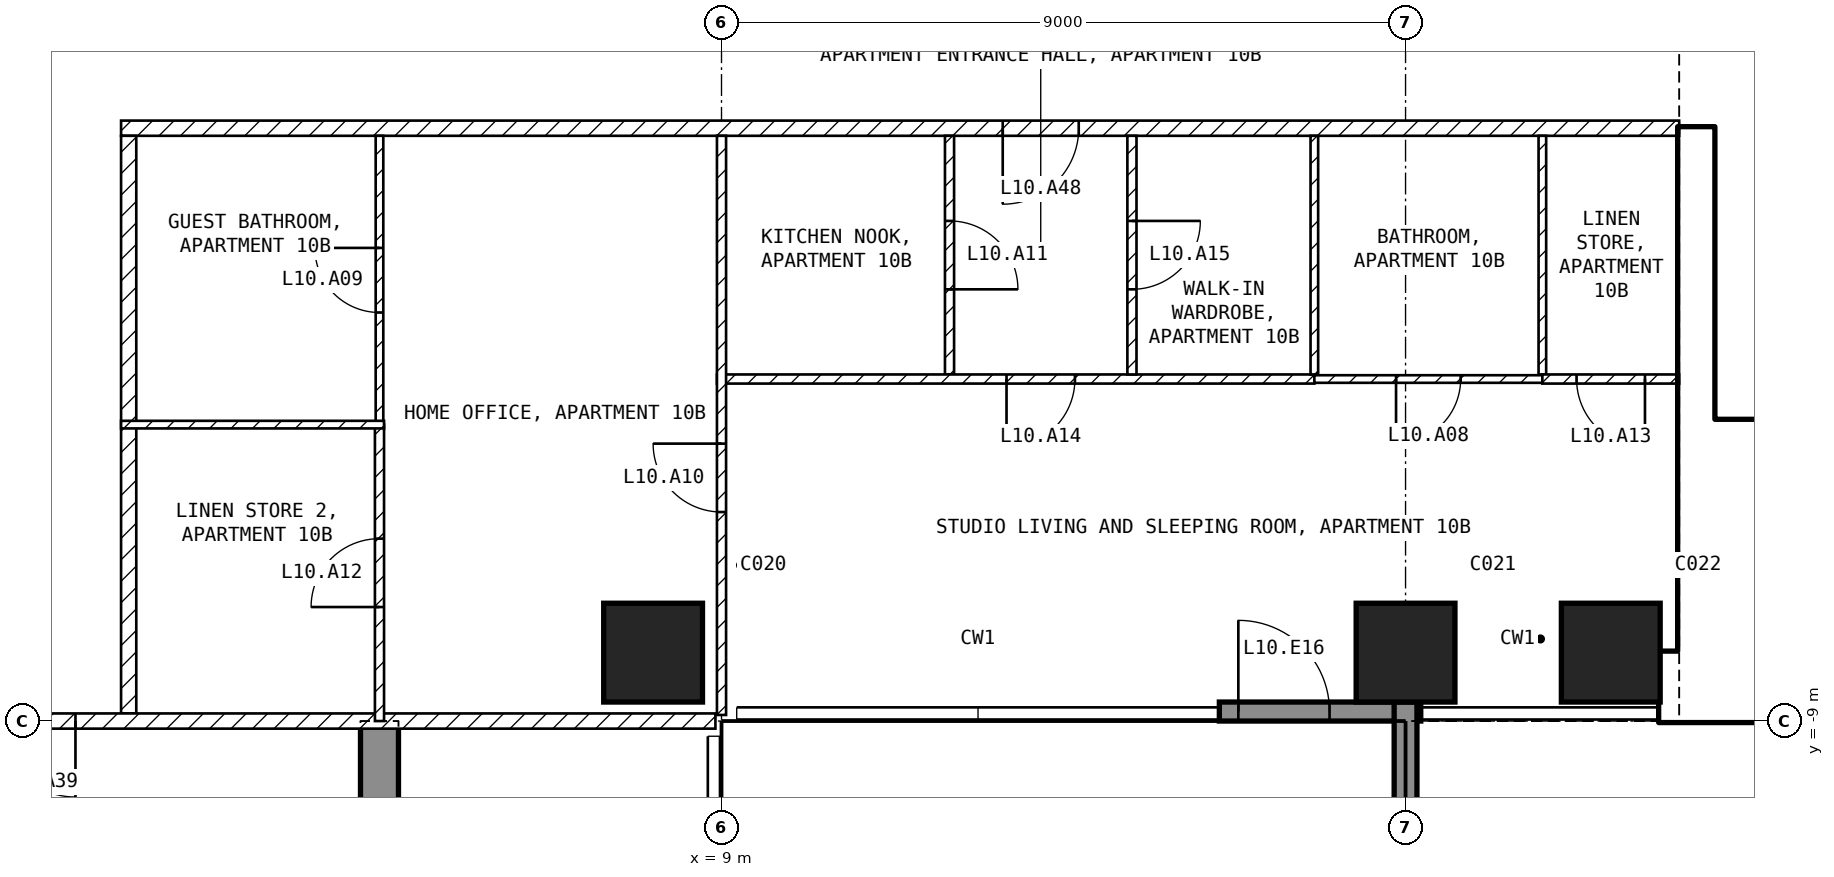
"""IFC4 building model, lengths in metres.
Left out: names, types, materials, properties, quantities, classifications, styles, units other than length and angle.
Written with IfcOpenShell. Run it as: python <this file> out.ifc"""

import sys

from ifc_helpers import new_model, si_unit, direction, frame, frame_2d, origin, origin_2d, place, context, subcontext, project, spatial, polyline, rectangle, outline, extrude, element, fill, save


model = new_model("IFC4")
c1 = context("Model", 3, precision=1e-05, world=origin(), true_north=direction((0.0, 1.0)))
c2 = subcontext(c1, "Body", "Model", "MODEL_VIEW")
j1 = project(units=[si_unit("LENGTHUNIT", "METRE"), si_unit("PLANEANGLEUNIT", "RADIAN")], contexts=[c1])
p1 = place(None, origin())
s1 = spatial("IfcSite", under=j1, at=p1, CompositionType="ELEMENT")
p2 = place(p1, origin())
s2 = spatial("IfcBuilding", under=s1, at=p2, CompositionType="ELEMENT")
p3 = place(p2, frame((0.0, 0.0, 54.0)))
s3 = spatial("IfcBuildingStorey", under=s2, at=p3, CompositionType="ELEMENT", Elevation=54.0)
for number, where, z_axis, x_axis in (
    (1, (8.1, -8.1, -0.25), (0.0, 0.0, 1.0), (1.0, 0.0, 0.0)),
    (2, (18.0, -8.1, -0.25), (0.0, 0.0, 1.0), (1.0, 0.0, 0.0)),
    (3, (20.7, -8.1, -0.25), (0.0, 0.0, 1.0), (1.0, 0.0, 0.0)),
):
    element("IfcColumn", number, at=place(p3, frame(where, z_axis=z_axis, x_axis=x_axis)), inside=s3, PredefinedType="COLUMN", context=c2, shape_type="SweptSolid", body=[
        extrude(rectangle(XDim=1.3, YDim=1.3, at=origin_2d()), origin(), (0.0, 0.0, 1.0), 3.5),
    ])
p4 = place(p3, frame((4.25, -25.45, -0.25), z_axis=(1.0, 0.0, 0.0), x_axis=(0.0, 1.0, 0.0)))
e4 = element("IfcWall", 4, at=p4, inside=s3, PredefinedType="SHEAR", context=c2, shape_type="SweptSolid", body=[
    extrude(outline(polyline([(0.0, 0.0), (4.15, 0.0), (4.15, 2.65), (6.55, 2.65), (6.55, 0.0), (11.95, 0.0), (11.95, 2.65), (14.35, 2.65), (14.35, 0.0), (16.45, 0.0), (16.45, 3.5), (0.0, 3.5), (0.0, 0.0)])), origin(), (0.0, 0.0, 1.0), 0.5),
])
p5 = place(p3, frame((15.55, -8.875, 0.0), z_axis=(0.0, 0.0, 1.0), x_axis=(1.0, 0.0, 0.0)))
e5 = element("IfcWall", 5, at=p5, inside=s3, PredefinedType="SOLIDWALL", context=c2, shape_type="SweptSolid", body=[
    extrude(rectangle(XDim=2.65, YDim=0.25, at=frame_2d((1.325, 0.0))), origin(), (0.0, 0.0, 1.0), 3.25),
])
p6 = place(p5, frame((0.25, 0.0, 0.0)))
e6 = element("IfcOpeningElement", 6, at=p6, cuts=e5, PredefinedType="OPENING", context=c2, shape_type="SweptSolid", body=[
    extrude(rectangle(XDim=1.2, YDim=2.4, at=frame_2d((0.6, 1.2))), frame((0.0, 0.135, 0.0), z_axis=(0.0, -1.0, 0.0), x_axis=(1.0, 0.0, 0.0)), (0.0, 0.0, 1.0), 0.27),
])
p7 = place(p3, frame((18.0, -8.75, 0.0), z_axis=(0.0, 0.0, 1.0), x_axis=(0.0, -1.0, 0.0)))
e7 = element("IfcWall", 7, at=p7, inside=s3, PredefinedType="SOLIDWALL", context=c2, shape_type="SweptSolid", body=[
    extrude(rectangle(XDim=2.95, YDim=0.3, at=frame_2d((1.475, 0.0))), origin(), (0.0, 0.0, 1.0), 3.25),
])
p8 = place(p3, frame((21.35, -8.55, 0.0), z_axis=(0.0, 0.0, 1.0), x_axis=(1.0, 0.0, 0.0)))
e8 = element("IfcWall", 8, at=p8, inside=s3, PredefinedType="SHEAR", context=c2, shape_type="SweptSolid", body=[
    extrude(rectangle(XDim=11.05, YDim=0.9, at=frame_2d((5.525, 0.0))), origin(), (0.0, 0.0, 1.0), 3.25),
])
p9 = place(p3, frame((21.825, -8.1, 0.0), z_axis=(0.0, 0.0, 1.0), x_axis=(0.0, 1.0, 0.0)))
e9 = element("IfcWall", 9, at=p9, inside=s3, PredefinedType="SHEAR", context=c2, shape_type="SweptSolid", body=[
    extrude(rectangle(XDim=6.9, YDim=0.45, at=frame_2d((3.45, 0.0))), origin(), (0.0, 0.0, 1.0), 3.25),
])
p10 = place(p3, frame((22.05, -5.15, 0.0), z_axis=(0.0, 0.0, 1.0), x_axis=(1.0, 0.0, 0.0)))
e10 = element("IfcWall", 10, at=p10, inside=s3, PredefinedType="SOLIDWALL", context=c2, shape_type="SweptSolid", body=[
    extrude(rectangle(XDim=6.3, YDim=0.2, at=frame_2d((3.15, 0.0))), origin(), (0.0, 0.0, 1.0), 3.25),
])
p11 = place(p10, frame((0.2, 0.0, 0.0)))
e11 = element("IfcOpeningElement", 11, at=p11, cuts=e10, PredefinedType="OPENING", context=c2, shape_type="SweptSolid", body=[
    extrude(rectangle(XDim=1.0, YDim=2.1, at=frame_2d((0.5, 1.05))), frame((0.0, 0.11, 0.0), z_axis=(0.0, -1.0, 0.0), x_axis=(1.0, 0.0, 0.0)), (0.0, 0.0, 1.0), 0.22),
])
p12 = place(p3, frame((21.6, -1.2, 0.0), z_axis=(0.0, 0.0, 1.0), x_axis=(-1.0, 0.0, 0.0)))
e12 = element("IfcWall", 12, at=p12, inside=s3, PredefinedType="PARTITIONING", context=c2, shape_type="SweptSolid", body=[
    extrude(rectangle(XDim=20.5, YDim=0.2, at=frame_2d((10.25, 0.0))), origin(), (0.0, 0.0, 1.0), 3.25),
])
p13 = place(p12, frame((7.9, 0.0, 0.0)))
e13 = element("IfcOpeningElement", 13, at=p13, cuts=e12, PredefinedType="OPENING", context=c2, shape_type="SweptSolid", body=[
    extrude(rectangle(XDim=1.0, YDim=2.1, at=frame_2d((0.5, 1.05))), frame((0.0, 0.11, 0.0), z_axis=(0.0, -1.0, 0.0), x_axis=(1.0, 0.0, 0.0)), (0.0, 0.0, 1.0), 0.22),
])
p14 = place(p3, frame((1.2, -1.3, 0.0), z_axis=(0.0, 0.0, 1.0), x_axis=(0.0, -1.0, 0.0)))
e14 = element("IfcWall", 14, at=p14, inside=s3, PredefinedType="PARTITIONING", context=c2, shape_type="SweptSolid", body=[
    extrude(rectangle(XDim=7.6, YDim=0.2, at=frame_2d((3.8, 0.0))), origin(), (0.0, 0.0, 1.0), 3.25),
])
p15 = place(p3, frame((8.92, -9.0, 0.0), z_axis=(0.0, 0.0, 1.0), x_axis=(-1.0, 0.0, 0.0)))
e15 = element("IfcWall", 15, at=p15, inside=s3, PredefinedType="PARTITIONING", context=c2, shape_type="SweptSolid", body=[
    extrude(rectangle(XDim=17.84, YDim=0.2, at=frame_2d((8.92, 0.0))), origin(), (0.0, 0.0, 1.0), 3.25),
])
p16 = place(p15, frame((8.42, 0.0, 0.0)))
e16 = element("IfcOpeningElement", 16, at=p16, cuts=e15, PredefinedType="OPENING", context=c2, shape_type="SweptSolid", body=[
    extrude(rectangle(XDim=1.0, YDim=2.1, at=frame_2d((0.5, 1.05))), frame((0.0, 0.11, 0.0), z_axis=(0.0, -1.0, 0.0), x_axis=(1.0, 0.0, 0.0)), (0.0, 0.0, 1.0), 0.22),
])
p17 = place(p3, frame((12.0, -1.3, 0.0), z_axis=(0.0, 0.0, 1.0), x_axis=(0.0, -1.0, 0.0)))
e17 = element("IfcWall", 17, at=p17, inside=s3, PredefinedType="PARTITIONING", context=c2, shape_type="SweptSolid", body=[
    extrude(rectangle(XDim=3.14, YDim=0.12, at=frame_2d((1.57, 0.0))), origin(), (0.0, 0.0, 1.0), 3.25),
])
p18 = place(p17, frame((1.12, 0.0, 0.0)))
e18 = element("IfcOpeningElement", 18, at=p18, cuts=e17, PredefinedType="OPENING", context=c2, shape_type="SweptSolid", body=[
    extrude(rectangle(XDim=0.9, YDim=2.1, at=frame_2d((0.45, 1.05))), frame((0.0, 0.07, 0.0), z_axis=(0.0, -1.0, 0.0), x_axis=(1.0, 0.0, 0.0)), (0.0, 0.0, 1.0), 0.14),
])
p19 = place(p3, frame((16.8, -4.5, 0.0), z_axis=(0.0, 0.0, 1.0), x_axis=(-1.0, 0.0, 0.0)))
e19 = element("IfcWall", 19, at=p19, inside=s3, PredefinedType="PARTITIONING", context=c2, shape_type="SweptSolid", body=[
    extrude(rectangle(XDim=7.86, YDim=0.12, at=frame_2d((3.93, 0.0))), origin(), (0.0, 0.0, 1.0), 3.25),
])
p20 = place(p19, frame((3.15, 0.0, 0.0)))
e20 = element("IfcOpeningElement", 20, at=p20, cuts=e19, PredefinedType="OPENING", context=c2, shape_type="SweptSolid", body=[
    extrude(rectangle(XDim=0.9, YDim=2.1, at=frame_2d((0.45, 1.05))), frame((0.0, 0.07, 0.0), z_axis=(0.0, -1.0, 0.0), x_axis=(1.0, 0.0, 0.0)), (0.0, 0.0, 1.0), 0.14),
])
p21 = place(p3, frame((9.0, -8.92, 0.0), z_axis=(0.0, 0.0, 1.0), x_axis=(0.0, 1.0, 0.0)))
e21 = element("IfcWall", 21, at=p21, inside=s3, PredefinedType="PARTITIONING", context=c2, shape_type="SweptSolid", body=[
    extrude(rectangle(XDim=7.62, YDim=0.12, at=frame_2d((3.81, 0.0))), origin(), (0.0, 0.0, 1.0), 3.25),
])
p22 = place(p21, frame((2.67, 0.0, 0.0)))
e22 = element("IfcOpeningElement", 22, at=p22, cuts=e21, PredefinedType="OPENING", context=c2, shape_type="SweptSolid", body=[
    extrude(rectangle(XDim=0.9, YDim=2.1, at=frame_2d((0.45, 1.05))), frame((0.0, 0.07, 0.0), z_axis=(0.0, -1.0, 0.0), x_axis=(1.0, 0.0, 0.0)), (0.0, 0.0, 1.0), 0.14),
])
p23 = place(p3, frame((14.4, -1.3, 0.0), z_axis=(0.0, 0.0, 1.0), x_axis=(0.0, -1.0, 0.0)))
e23 = element("IfcWall", 23, at=p23, inside=s3, PredefinedType="PARTITIONING", context=c2, shape_type="SweptSolid", body=[
    extrude(rectangle(XDim=3.14, YDim=0.12, at=frame_2d((1.57, 0.0))), origin(), (0.0, 0.0, 1.0), 3.25),
])
p24 = place(p23, frame((1.12, 0.0, 0.0)))
e24 = element("IfcOpeningElement", 24, at=p24, cuts=e23, PredefinedType="OPENING", context=c2, shape_type="SweptSolid", body=[
    extrude(rectangle(XDim=0.9, YDim=2.1, at=frame_2d((0.45, 1.05))), frame((0.0, 0.07, 0.0), z_axis=(0.0, -1.0, 0.0), x_axis=(1.0, 0.0, 0.0)), (0.0, 0.0, 1.0), 0.14),
])
for number, where, z_axis, x_axis in (
    (25, (16.8, -1.3, 0.0), (0.0, 0.0, 1.0), (0.0, -1.0, 0.0)),
    (26, (19.8, -1.3, 0.0), (0.0, 0.0, 1.0), (0.0, -1.0, 0.0)),
):
    element("IfcWall", number, at=place(p3, frame(where, z_axis=z_axis, x_axis=x_axis)), inside=s3, PredefinedType="PARTITIONING", context=c2, shape_type="SweptSolid", body=[
        extrude(rectangle(XDim=3.14, YDim=0.1, at=frame_2d((1.57, 0.0))), origin(), (0.0, 0.0, 1.0), 3.25),
    ])
p25 = place(p3, frame((19.8, -4.5, 0.0), z_axis=(0.0, 0.0, 1.0), x_axis=(-1.0, 0.0, 0.0)))
e27 = element("IfcWall", 27, at=p25, inside=s3, PredefinedType="PARTITIONING", context=c2, shape_type="SweptSolid", body=[
    extrude(rectangle(XDim=3.0, YDim=0.1, at=frame_2d((1.5, 0.0))), origin(), (0.0, 0.0, 1.0), 3.25),
])
p26 = place(p25, frame((1.075, 0.0, 0.0)))
e28 = element("IfcOpeningElement", 28, at=p26, cuts=e27, PredefinedType="OPENING", context=c2, shape_type="SweptSolid", body=[
    extrude(rectangle(XDim=0.85, YDim=2.1, at=frame_2d((0.425, 1.05))), frame((0.0, 0.06, 0.0), z_axis=(0.0, -1.0, 0.0), x_axis=(1.0, 0.0, 0.0)), (0.0, 0.0, 1.0), 0.12),
])
p27 = place(p3, frame((21.6, -4.5, 0.0), z_axis=(0.0, 0.0, 1.0), x_axis=(-1.0, 0.0, 0.0)))
e29 = element("IfcWall", 29, at=p27, inside=s3, PredefinedType="PARTITIONING", context=c2, shape_type="SweptSolid", body=[
    extrude(rectangle(XDim=1.8, YDim=0.12, at=frame_2d((0.9, 0.0))), origin(), (0.0, 0.0, 1.0), 3.25),
])
p28 = place(p27, frame((0.45, 0.0, 0.0)))
e30 = element("IfcOpeningElement", 30, at=p28, cuts=e29, PredefinedType="OPENING", context=c2, shape_type="SweptSolid", body=[
    extrude(rectangle(XDim=0.9, YDim=2.1, at=frame_2d((0.45, 1.05))), frame((0.0, 0.07, 0.0), z_axis=(0.0, -1.0, 0.0), x_axis=(1.0, 0.0, 0.0)), (0.0, 0.0, 1.0), 0.14),
])
p29 = place(p3, frame((4.5, -5.1, 0.0), z_axis=(0.0, 0.0, 1.0), x_axis=(0.0, 1.0, 0.0)))
e31 = element("IfcWall", 31, at=p29, inside=s3, PredefinedType="PARTITIONING", context=c2, shape_type="SweptSolid", body=[
    extrude(rectangle(XDim=3.8, YDim=0.1, at=frame_2d((1.9, 0.0))), origin(), (0.0, 0.0, 1.0), 3.25),
])
p30 = place(p29, frame((1.475, 0.0, 0.0)))
e32 = element("IfcOpeningElement", 32, at=p30, cuts=e31, PredefinedType="OPENING", context=c2, shape_type="SweptSolid", body=[
    extrude(rectangle(XDim=0.85, YDim=2.1, at=frame_2d((0.425, 1.05))), frame((0.0, 0.06, 0.0), z_axis=(0.0, -1.0, 0.0), x_axis=(1.0, 0.0, 0.0)), (0.0, 0.0, 1.0), 0.12),
])
p31 = place(p3, frame((4.5, -9.0, 0.0), z_axis=(0.0, 0.0, 1.0), x_axis=(0.0, 1.0, 0.0)))
e33 = element("IfcWall", 33, at=p31, inside=s3, PredefinedType="PARTITIONING", context=c2, shape_type="SweptSolid", body=[
    extrude(rectangle(XDim=3.9, YDim=0.12, at=frame_2d((1.95, 0.0))), origin(), (0.0, 0.0, 1.0), 3.25),
])
p32 = place(p31, frame((1.5, 0.0, 0.0)))
e34 = element("IfcOpeningElement", 34, at=p32, cuts=e33, PredefinedType="OPENING", context=c2, shape_type="SweptSolid", body=[
    extrude(rectangle(XDim=0.9, YDim=2.1, at=frame_2d((0.45, 1.05))), frame((0.0, 0.07, 0.0), z_axis=(0.0, -1.0, 0.0), x_axis=(1.0, 0.0, 0.0)), (0.0, 0.0, 1.0), 0.14),
])
p33 = place(p3, frame((4.56, -5.1, 0.0), z_axis=(0.0, 0.0, 1.0), x_axis=(-1.0, 0.0, 0.0)))
e35 = element("IfcWall", 35, at=p33, inside=s3, PredefinedType="PARTITIONING", context=c2, shape_type="SweptSolid", body=[
    extrude(rectangle(XDim=3.46, YDim=0.1, at=frame_2d((1.73, 0.0))), origin(), (0.0, 0.0, 1.0), 3.25),
])
p34 = place(p6, origin())
e36 = element("IfcDoor", 36, at=p34, inside=s3, OperationType="SINGLE_SWING_LEFT", PredefinedType="DOOR", context=c2, shape_type="SweptSolid", body=[
    extrude(rectangle(XDim=1.2, YDim=2.4, at=frame_2d((0.6, 1.2))), frame((0.0, 0.025, 0.0), z_axis=(0.0, -1.0, 0.0), x_axis=(1.0, 0.0, 0.0)), (0.0, 0.0, 1.0), 0.05),
])
fill(e6, e36)
p35 = place(p11, origin())
e37 = element("IfcDoor", 37, at=p35, inside=s3, OperationType="SINGLE_SWING_LEFT", PredefinedType="DOOR", context=c2, shape_type="SweptSolid", body=[
    extrude(rectangle(XDim=1.0, YDim=2.1, at=frame_2d((0.5, 1.05))), frame((0.0, 0.025, 0.0), z_axis=(0.0, -1.0, 0.0), x_axis=(1.0, 0.0, 0.0)), (0.0, 0.0, 1.0), 0.05),
])
fill(e11, e37)
p36 = place(p26, origin())
e38 = element("IfcDoor", 38, at=p36, inside=s3, OperationType="SINGLE_SWING_RIGHT", PredefinedType="DOOR", context=c2, shape_type="SweptSolid", body=[
    extrude(rectangle(XDim=0.85, YDim=2.1, at=frame_2d((0.425, 1.05))), frame((0.0, 0.025, 0.0), z_axis=(0.0, -1.0, 0.0), x_axis=(1.0, 0.0, 0.0)), (0.0, 0.0, 1.0), 0.05),
])
fill(e28, e38)
p37 = place(p30, origin())
e39 = element("IfcDoor", 39, at=p37, inside=s3, OperationType="SINGLE_SWING_RIGHT", PredefinedType="DOOR", context=c2, shape_type="SweptSolid", body=[
    extrude(rectangle(XDim=0.85, YDim=2.1, at=frame_2d((0.425, 1.05))), frame((0.0, 0.025, 0.0), z_axis=(0.0, -1.0, 0.0), x_axis=(1.0, 0.0, 0.0)), (0.0, 0.0, 1.0), 0.05),
])
fill(e32, e39)
p38 = place(p22, origin())
e40 = element("IfcDoor", 40, at=p38, inside=s3, OperationType="SINGLE_SWING_RIGHT", PredefinedType="DOOR", context=c2, shape_type="SweptSolid", body=[
    extrude(rectangle(XDim=0.9, YDim=2.1, at=frame_2d((0.45, 1.05))), frame((0.0, 0.025, 0.0), z_axis=(0.0, -1.0, 0.0), x_axis=(1.0, 0.0, 0.0)), (0.0, 0.0, 1.0), 0.05),
])
fill(e22, e40)
p39 = place(p18, origin())
e41 = element("IfcDoor", 41, at=p39, inside=s3, OperationType="SINGLE_SWING_RIGHT", PredefinedType="DOOR", context=c2, shape_type="SweptSolid", body=[
    extrude(rectangle(XDim=0.9, YDim=2.1, at=frame_2d((0.45, 1.05))), frame((0.0, 0.025, 0.0), z_axis=(0.0, -1.0, 0.0), x_axis=(1.0, 0.0, 0.0)), (0.0, 0.0, 1.0), 0.05),
])
fill(e18, e41)
p40 = place(p32, origin())
e42 = element("IfcDoor", 42, at=p40, inside=s3, OperationType="SINGLE_SWING_LEFT", PredefinedType="DOOR", context=c2, shape_type="SweptSolid", body=[
    extrude(rectangle(XDim=0.9, YDim=2.1, at=frame_2d((0.45, 1.05))), frame((0.0, 0.025, 0.0), z_axis=(0.0, -1.0, 0.0), x_axis=(1.0, 0.0, 0.0)), (0.0, 0.0, 1.0), 0.05),
])
fill(e34, e42)
p41 = place(p28, origin())
e43 = element("IfcDoor", 43, at=p41, inside=s3, OperationType="SINGLE_SWING_LEFT", PredefinedType="DOOR", context=c2, shape_type="SweptSolid", body=[
    extrude(rectangle(XDim=0.9, YDim=2.1, at=frame_2d((0.45, 1.05))), frame((0.0, 0.025, 0.0), z_axis=(0.0, -1.0, 0.0), x_axis=(1.0, 0.0, 0.0)), (0.0, 0.0, 1.0), 0.05),
])
fill(e30, e43)
p42 = place(p20, origin())
e44 = element("IfcDoor", 44, at=p42, inside=s3, OperationType="SINGLE_SWING_RIGHT", PredefinedType="DOOR", context=c2, shape_type="SweptSolid", body=[
    extrude(rectangle(XDim=0.9, YDim=2.1, at=frame_2d((0.45, 1.05))), frame((0.0, 0.025, 0.0), z_axis=(0.0, -1.0, 0.0), x_axis=(1.0, 0.0, 0.0)), (0.0, 0.0, 1.0), 0.05),
])
fill(e20, e44)
p43 = place(p24, origin())
e45 = element("IfcDoor", 45, at=p43, inside=s3, OperationType="SINGLE_SWING_LEFT", PredefinedType="DOOR", context=c2, shape_type="SweptSolid", body=[
    extrude(rectangle(XDim=0.9, YDim=2.1, at=frame_2d((0.45, 1.05))), frame((0.0, 0.025, 0.0), z_axis=(0.0, -1.0, 0.0), x_axis=(1.0, 0.0, 0.0)), (0.0, 0.0, 1.0), 0.05),
])
fill(e24, e45)
p44 = place(p16, origin())
e46 = element("IfcDoor", 46, at=p44, inside=s3, OperationType="SINGLE_SWING_LEFT", PredefinedType="DOOR", context=c2, shape_type="SweptSolid", body=[
    extrude(rectangle(XDim=1.0, YDim=2.1, at=frame_2d((0.5, 1.05))), frame((0.0, 0.025, 0.0), z_axis=(0.0, -1.0, 0.0), x_axis=(1.0, 0.0, 0.0)), (0.0, 0.0, 1.0), 0.05),
])
fill(e16, e46)
p45 = place(p13, origin())
e47 = element("IfcDoor", 47, at=p45, inside=s3, OperationType="SINGLE_SWING_RIGHT", PredefinedType="DOOR", context=c2, shape_type="SweptSolid", body=[
    extrude(rectangle(XDim=1.0, YDim=2.1, at=frame_2d((0.5, 1.05))), frame((0.0, 0.025, 0.0), z_axis=(0.0, -1.0, 0.0), x_axis=(1.0, 0.0, 0.0)), (0.0, 0.0, 1.0), 0.05),
])
fill(e13, e47)
save(model, sys.argv[1])
